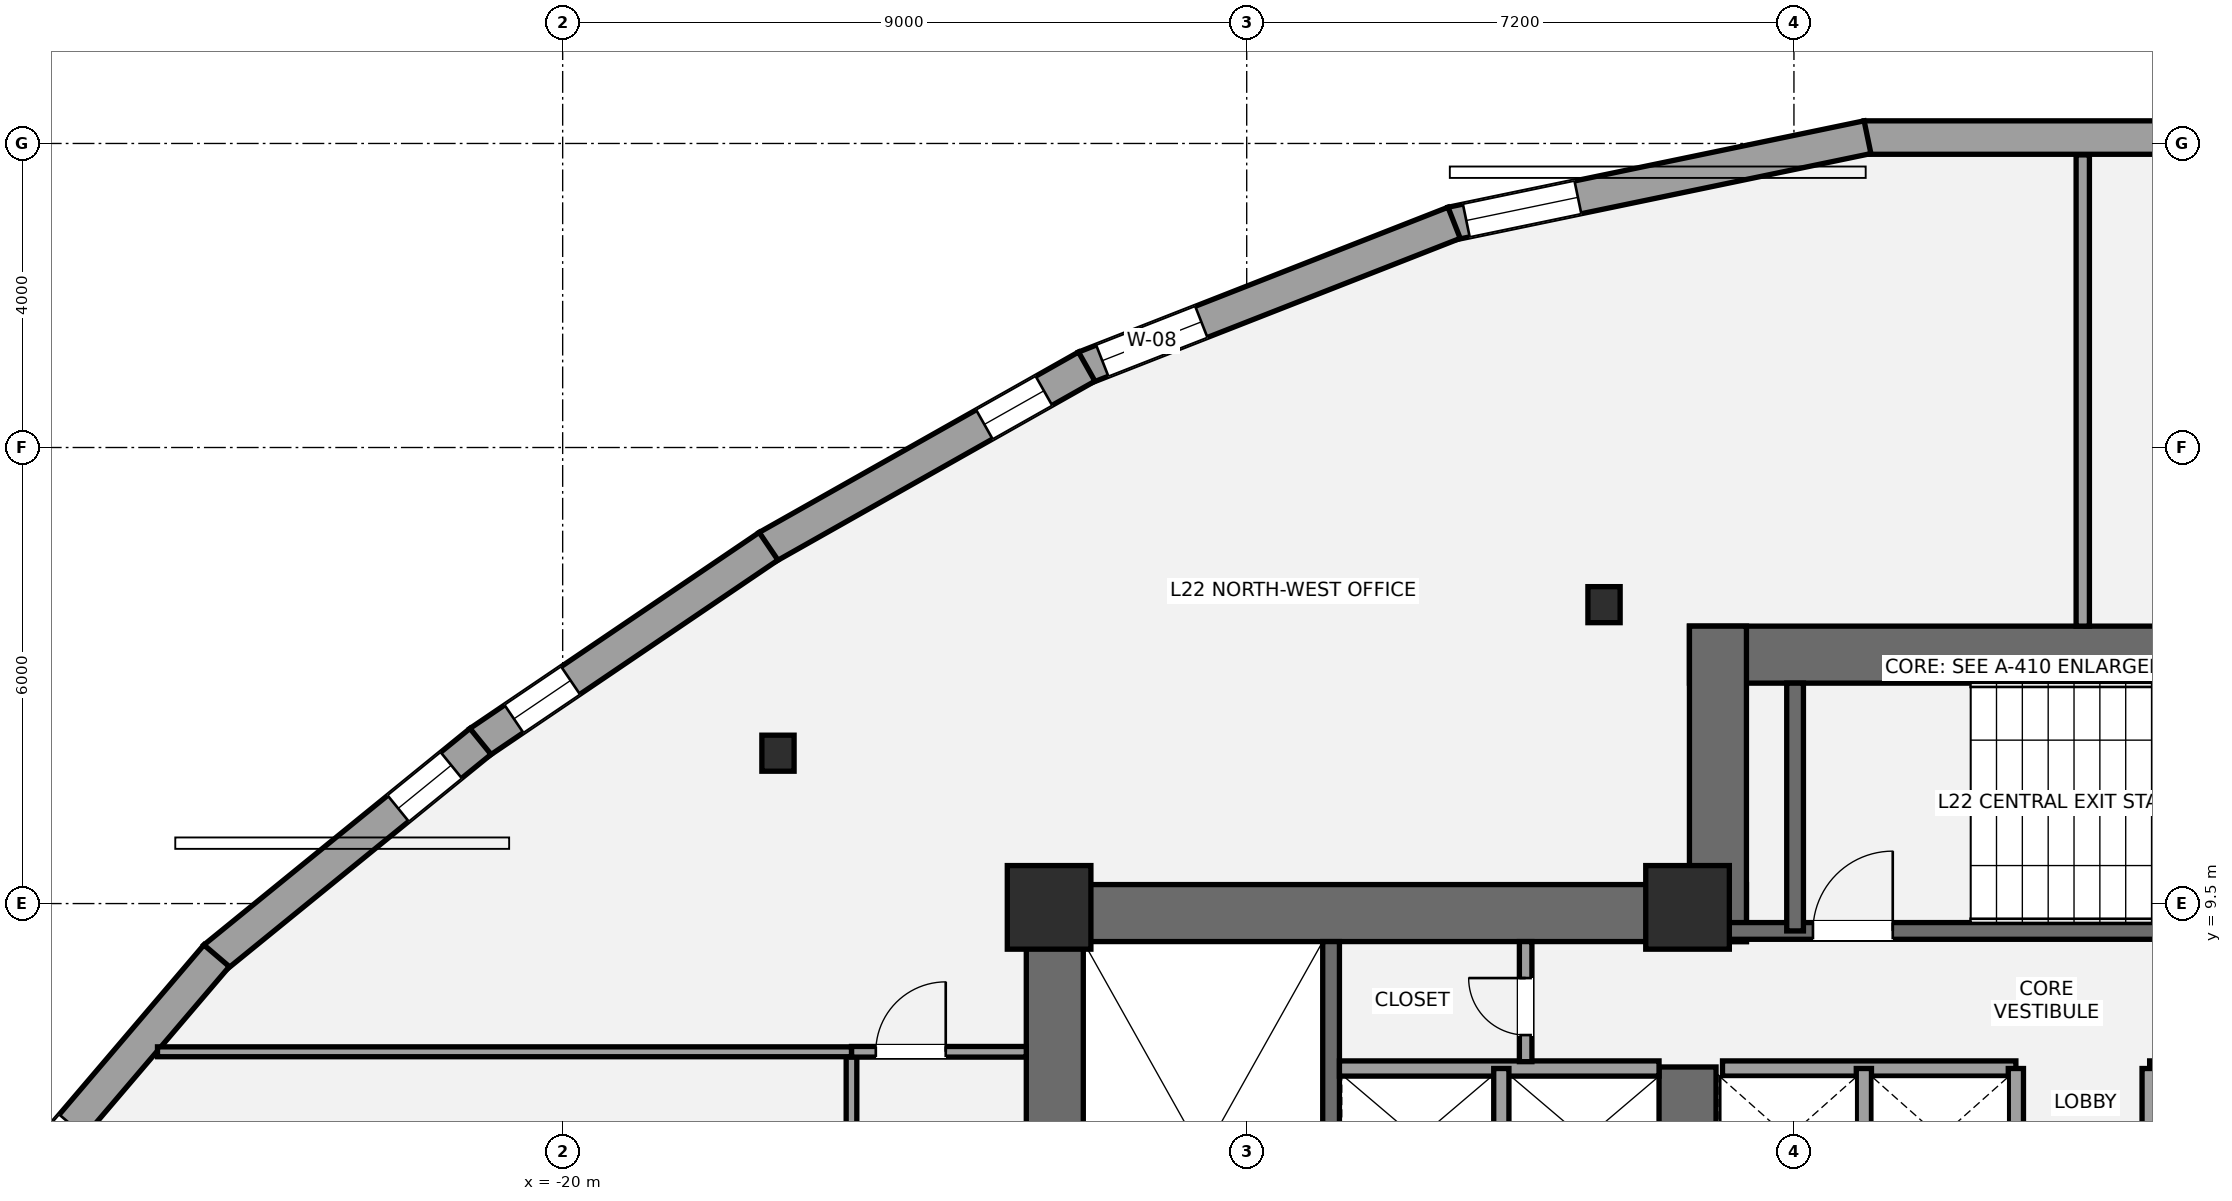
"""IFC4 building model, lengths in metres.
Left out: names, types, materials, properties, quantities, classifications, styles, units other than length and angle.
Written with IfcOpenShell. Run it as: python <this file> out.ifc"""

import sys

from ifc_helpers import new_model, si_unit, direction, frame, frame_2d, origin, origin_2d, place, context, subcontext, project, spatial, rectangle, i_section, extrude, element, fill, save


model = new_model("IFC4")
c1 = context("Model", 3, precision=1e-05, world=origin(), true_north=direction((0.0, 1.0)))
c2 = subcontext(c1, "Body", "Model", "MODEL_VIEW")
j1 = project(units=[si_unit("LENGTHUNIT", "METRE"), si_unit("PLANEANGLEUNIT", "RADIAN")], contexts=[c1])
p1 = place(None, origin())
s1 = spatial("IfcSite", under=j1, at=p1, CompositionType="ELEMENT")
p2 = place(p1, origin())
s2 = spatial("IfcBuilding", under=s1, at=p2, CompositionType="ELEMENT")
p3 = place(p2, frame((0.0, 0.0, 86.1)))
s3 = spatial("IfcBuildingStorey", under=s2, at=p3, CompositionType="ELEMENT", Elevation=86.1)
p4 = place(p3, frame((-13.525, 1.1, 0.0), z_axis=(0.0, 0.0, 1.0), x_axis=(0.0, 1.0, 0.0)))
e1 = element("IfcWall", 1, at=p4, inside=s3, PredefinedType="SHEAR", context=c2, shape_type="SweptSolid", body=[
    extrude(rectangle(XDim=8.65, YDim=0.75, at=frame_2d((4.325, 0.0))), origin(), (0.0, 0.0, 1.0), 3.5),
])
p5 = place(p3, frame((-13.9, 9.375, 0.0), z_axis=(0.0, 0.0, 1.0), x_axis=(1.0, 0.0, 0.0)))
e2 = element("IfcWall", 2, at=p5, inside=s3, PredefinedType="SHEAR", context=c2, shape_type="SweptSolid", body=[
    extrude(rectangle(XDim=9.475, YDim=0.75, at=frame_2d((4.737, 0.0))), origin(), (0.0, 0.0, 1.0), 3.5),
])
p6 = place(p3, frame((-5.2, 5.35, 0.0), z_axis=(0.0, 0.0, 1.0), x_axis=(0.0, 1.0, 0.0)))
e3 = element("IfcWall", 3, at=p6, inside=s3, PredefinedType="SHEAR", context=c2, shape_type="SweptSolid", body=[
    extrude(rectangle(XDim=2.0, YDim=0.75, at=frame_2d((1.0, 0.0))), origin(), (0.0, 0.0, 1.0), 3.5),
])
p7 = place(p3, frame((-9.89, 1.85, 0.0), z_axis=(0.0, 0.0, 1.0), x_axis=(0.0, 1.0, 0.0)))
e4 = element("IfcWall", 4, at=p7, inside=s3, PredefinedType="SHEAR", context=c2, shape_type="SweptSolid", body=[
    extrude(rectangle(XDim=7.15, YDim=0.22, at=frame_2d((3.575, 0.0))), origin(), (0.0, 0.0, 1.0), 3.5),
])
p8 = place(p3, frame((-5.175, 12.775, 0.0), z_axis=(0.0, 0.0, 1.0), x_axis=(1.0, 0.0, 0.0)))
e5 = element("IfcWall", 5, at=p8, inside=s3, PredefinedType="SHEAR", context=c2, shape_type="SweptSolid", body=[
    extrude(rectangle(XDim=10.35, YDim=0.75, at=frame_2d((5.175, 0.0))), origin(), (0.0, 0.0, 1.0), 3.5),
])
p9 = place(p3, frame((-4.8, 9.0, 0.0), z_axis=(0.0, 0.0, 1.0), x_axis=(0.0, 1.0, 0.0)))
e6 = element("IfcWall", 6, at=p9, inside=s3, PredefinedType="SHEAR", context=c2, shape_type="SweptSolid", body=[
    extrude(rectangle(XDim=4.15, YDim=0.75, at=frame_2d((2.075, 0.0))), origin(), (0.0, 0.0, 1.0), 3.5),
])
p10 = place(p3, frame((-4.7, 9.14, 0.0), z_axis=(0.0, 0.0, 1.0), x_axis=(1.0, 0.0, 0.0)))
e7 = element("IfcWall", 7, at=p10, inside=s3, PredefinedType="SHEAR", context=c2, shape_type="SweptSolid", body=[
    extrude(rectangle(XDim=9.3, YDim=0.22, at=frame_2d((4.65, 0.0))), origin(), (0.0, 0.0, 1.0), 3.5),
])
p11 = place(p10, frame((1.15, 0.0, 0.0)))
e8 = element("IfcOpeningElement", 8, at=p11, cuts=e7, PredefinedType="OPENING", context=c2, shape_type="SweptSolid", body=[
    extrude(rectangle(XDim=1.05, YDim=2.15, at=frame_2d((0.525, 1.075))), frame((0.0, 0.12, 0.0), z_axis=(0.0, -1.0, 0.0), x_axis=(1.0, 0.0, 0.0)), (0.0, 0.0, 1.0), 0.24),
])
p12 = place(p3, frame((-3.785, 9.14, 0.0), z_axis=(0.0, 0.0, 1.0), x_axis=(0.0, 1.0, 0.0)))
e9 = element("IfcWall", 9, at=p12, inside=s3, PredefinedType="SHEAR", context=c2, shape_type="SweptSolid", body=[
    extrude(rectangle(XDim=3.26, YDim=0.22, at=frame_2d((1.63, 0.0))), origin(), (0.0, 0.0, 1.0), 3.5),
])
for number, where, z_axis, x_axis in (
    (10, (-13.6, 9.45, 0.0), (0.0, 0.0, 1.0), (1.0, 0.0, 0.0)),
    (11, (-5.2, 9.45, 0.0), (0.0, 0.0, 1.0), (1.0, 0.0, 0.0)),
):
    element("IfcColumn", number, at=place(p3, frame(where, z_axis=z_axis, x_axis=x_axis)), inside=s3, PredefinedType="COLUMN", context=c2, shape_type="SweptSolid", body=[
        extrude(rectangle(XDim=1.1, YDim=1.1, at=origin_2d()), origin(), (0.0, 0.0, 1.0), 3.5),
    ])
for number, where, z_axis, x_axis in (
    (12, (-6.299, 13.433, 0.0), (0.0, 0.0, 1.0), (1.0, 0.0, 0.0)),
    (13, (-17.167, 11.478, 0.0), (0.0, 0.0, 1.0), (1.0, 0.0, 0.0)),
):
    element("IfcColumn", number, at=place(p3, frame(where, z_axis=z_axis, x_axis=x_axis)), inside=s3, PredefinedType="COLUMN", context=c2, shape_type="SweptSolid", body=[
        extrude(i_section(OverallWidth=0.424, OverallDepth=0.474, WebThickness=0.048, FlangeThickness=0.077, at=origin_2d()), origin(), (0.0, 0.0, 1.0), 3.5),
    ])
p13 = place(p3, frame((-2.877, 19.578, 0.0), z_axis=(0.0, 0.0, 1.0), x_axis=(1.0, 0.0, 0.0)))
e14 = element("IfcWall", 14, at=p13, inside=s3, PredefinedType="STANDARD", context=c2, shape_type="SweptSolid", body=[
    extrude(rectangle(XDim=5.753, YDim=0.44, at=frame_2d((2.877, 0.0))), origin(), (0.0, 0.0, 1.0), 2.528),
])
p14 = place(p13, frame((4.004, 0.0, 0.65)))
e15 = element("IfcOpeningElement", 15, at=p14, cuts=e14, PredefinedType="OPENING", context=c2, shape_type="SweptSolid", body=[
    extrude(rectangle(XDim=1.5, YDim=1.7, at=frame_2d((0.75, 0.85))), frame((0.0, 0.23, 0.0), z_axis=(0.0, -1.0, 0.0), x_axis=(1.0, 0.0, 0.0)), (0.0, 0.0, 1.0), 0.46),
])
p15 = place(p3, frame((-8.307, 18.446, 0.0), z_axis=(0.0, 0.0, 1.0), x_axis=(0.979118590293, 0.20328990664, 0.0)))
e16 = element("IfcWall", 16, at=p15, inside=s3, PredefinedType="STANDARD", context=c2, shape_type="SweptSolid", body=[
    extrude(rectangle(XDim=5.592, YDim=0.44, at=frame_2d((2.796, 0.0))), origin(), (0.0, 0.0, 1.0), 2.528),
])
p16 = place(p15, frame((0.2, 0.0, 0.65)))
e17 = element("IfcOpeningElement", 17, at=p16, cuts=e16, PredefinedType="OPENING", context=c2, shape_type="SweptSolid", body=[
    extrude(rectangle(XDim=1.5, YDim=1.7, at=frame_2d((0.75, 0.85))), frame((0.0, 0.23, 0.0), z_axis=(0.0, -1.0, 0.0), x_axis=(1.0, 0.0, 0.0)), (0.0, 0.0, 1.0), 0.46),
])
p17 = place(p3, frame((-13.133, 16.551, 0.0), z_axis=(0.0, 0.0, 1.0), x_axis=(0.931059171354, 0.364868222017, 0.0)))
e18 = element("IfcWall", 18, at=p17, inside=s3, PredefinedType="STANDARD", context=c2, shape_type="SweptSolid", body=[
    extrude(rectangle(XDim=5.222, YDim=0.44, at=frame_2d((2.611, 0.0))), origin(), (0.0, 0.0, 1.0), 2.528),
])
p18 = place(p17, frame((0.25, 0.0, 0.58)))
e19 = element("IfcOpeningElement", 19, at=p18, cuts=e18, PredefinedType="OPENING", context=c2, shape_type="SweptSolid", body=[
    extrude(rectangle(XDim=1.4, YDim=1.55, at=frame_2d((0.7, 0.775))), frame((0.0, 0.23, 0.0), z_axis=(0.0, -1.0, 0.0), x_axis=(1.0, 0.0, 0.0)), (0.0, 0.0, 1.0), 0.46),
])
p19 = place(p3, frame((-17.306, 14.191, 0.0), z_axis=(0.0, 0.0, 1.0), x_axis=(0.870732411856, 0.491757121903, 0.0)))
e20 = element("IfcWall", 20, at=p19, inside=s3, PredefinedType="STANDARD", context=c2, shape_type="SweptSolid", body=[
    extrude(rectangle(XDim=4.825, YDim=0.44, at=frame_2d((2.413, 0.0))), origin(), (0.0, 0.0, 1.0), 2.528),
])
p20 = place(p19, frame((3.278, 0.0, 0.58)))
e21 = element("IfcOpeningElement", 21, at=p20, cuts=e20, PredefinedType="OPENING", context=c2, shape_type="SweptSolid", body=[
    extrude(rectangle(XDim=0.9, YDim=1.35, at=frame_2d((0.45, 0.675))), frame((0.0, 0.23, 0.0), z_axis=(0.0, -1.0, 0.0), x_axis=(1.0, 0.0, 0.0)), (0.0, 0.0, 1.0), 0.46),
])
p21 = place(p3, frame((-21.096, 11.622, 0.0), z_axis=(0.0, 0.0, 1.0), x_axis=(0.827777061901, 0.561057159112, 0.0)))
e22 = element("IfcWall", 22, at=p21, inside=s3, PredefinedType="STANDARD", context=c2, shape_type="SweptSolid", body=[
    extrude(rectangle(XDim=4.597, YDim=0.44, at=frame_2d((2.298, 0.0))), origin(), (0.0, 0.0, 1.0), 2.528),
])
p22 = place(p21, frame((0.55, 0.0, 0.58)))
e23 = element("IfcOpeningElement", 23, at=p22, cuts=e22, PredefinedType="OPENING", context=c2, shape_type="SweptSolid", body=[
    extrude(rectangle(XDim=0.9, YDim=1.35, at=frame_2d((0.45, 0.675))), frame((0.0, 0.23, 0.0), z_axis=(0.0, -1.0, 0.0), x_axis=(1.0, 0.0, 0.0)), (0.0, 0.0, 1.0), 0.46),
])
p23 = place(p3, frame((-24.582, 8.785, 0.0), z_axis=(0.0, 0.0, 1.0), x_axis=(0.775728286929, 0.631067052585, 0.0)))
e24 = element("IfcWall", 24, at=p23, inside=s3, PredefinedType="STANDARD", context=c2, shape_type="SweptSolid", body=[
    extrude(rectangle(XDim=4.513, YDim=0.44, at=frame_2d((2.256, 0.0))), origin(), (0.0, 0.0, 1.0), 2.528),
])
p24 = place(p23, frame((3.116, 0.0, 0.58)))
e25 = element("IfcOpeningElement", 25, at=p24, cuts=e24, PredefinedType="OPENING", context=c2, shape_type="SweptSolid", body=[
    extrude(rectangle(XDim=0.9, YDim=1.35, at=frame_2d((0.45, 0.675))), frame((0.0, 0.23, 0.0), z_axis=(0.0, -1.0, 0.0), x_axis=(1.0, 0.0, 0.0)), (0.0, 0.0, 1.0), 0.46),
])
p25 = place(p3, frame((-27.364, 5.518, 0.0), z_axis=(0.0, 0.0, 1.0), x_axis=(0.648913975558, 0.760861782669, 0.0)))
e26 = element("IfcWall", 26, at=p25, inside=s3, PredefinedType="STANDARD", context=c2, shape_type="SweptSolid", body=[
    extrude(rectangle(XDim=4.331, YDim=0.44, at=frame_2d((2.166, 0.0))), origin(), (0.0, 0.0, 1.0), 2.528),
])
p26 = place(p25, frame((0.498, 0.0, 0.58)))
e27 = element("IfcOpeningElement", 27, at=p26, cuts=e26, PredefinedType="OPENING", context=c2, shape_type="SweptSolid", body=[
    extrude(rectangle(XDim=0.9, YDim=1.35, at=frame_2d((0.45, 0.675))), frame((0.0, 0.23, 0.0), z_axis=(0.0, -1.0, 0.0), x_axis=(1.0, 0.0, 0.0)), (0.0, 0.0, 1.0), 0.46),
])
p27 = place(p3, frame((-9.78, 7.33, 0.0), z_axis=(0.0, 0.0, 1.0), x_axis=(1.0, 0.0, 0.0)))
e28 = element("IfcWall", 28, at=p27, inside=s3, PredefinedType="SOLIDWALL", context=c2, shape_type="SweptSolid", body=[
    extrude(rectangle(XDim=4.205, YDim=0.2, at=frame_2d((2.103, 0.0))), origin(), (0.0, 0.0, 1.0), 3.31),
])
p28 = place(p3, frame((-7.65, 5.47, 0.0), z_axis=(0.0, 0.0, 1.0), x_axis=(0.0, 1.0, 0.0)))
e29 = element("IfcWall", 29, at=p28, inside=s3, PredefinedType="SOLIDWALL", context=c2, shape_type="SweptSolid", body=[
    extrude(rectangle(XDim=1.86, YDim=0.2, at=frame_2d((0.93, 0.0))), origin(), (0.0, 0.0, 1.0), 3.31),
])
for number, where, z_axis, x_axis in (
    (30, (-4.74, 7.33, 0.0), (0.0, 0.0, 1.0), (1.0, 0.0, 0.0)),
    (31, (0.88, 7.33, 0.0), (0.0, 0.0, 1.0), (1.0, 0.0, 0.0)),
):
    element("IfcWall", number, at=place(p3, frame(where, z_axis=z_axis, x_axis=x_axis)), inside=s3, PredefinedType="SOLIDWALL", context=c2, shape_type="SweptSolid", body=[
        extrude(rectangle(XDim=3.86, YDim=0.2, at=frame_2d((1.93, 0.0))), origin(), (0.0, 0.0, 1.0), 3.31),
    ])
for number, where, z_axis, x_axis in (
    (32, (-2.88, 5.52, 0.0), (0.0, 0.0, 1.0), (0.0, 1.0, 0.0)),
    (33, (-0.88, 5.52, 0.0), (0.0, 0.0, 1.0), (0.0, 1.0, 0.0)),
    (34, (0.88, 5.52, 0.0), (0.0, 0.0, 1.0), (0.0, 1.0, 0.0)),
):
    element("IfcWall", number, at=place(p3, frame(where, z_axis=z_axis, x_axis=x_axis)), inside=s3, PredefinedType="SOLIDWALL", context=c2, shape_type="SweptSolid", body=[
        extrude(rectangle(XDim=1.81, YDim=0.2, at=frame_2d((0.905, 0.0))), origin(), (0.0, 0.0, 1.0), 3.31),
    ])
p29 = place(p3, frame((-7.33, 7.42, 0.0), z_axis=(0.0, 0.0, 1.0), x_axis=(0.0, 1.0, 0.0)))
e35 = element("IfcWall", 35, at=p29, inside=s3, PredefinedType="PARTITIONING", context=c2, shape_type="SweptSolid", body=[
    extrude(rectangle(XDim=1.58, YDim=0.165, at=frame_2d((0.79, 0.0))), origin(), (0.0, 0.0, 1.0), 3.31),
])
p30 = place(p29, frame((0.35, 0.0, 0.0)))
e36 = element("IfcOpeningElement", 36, at=p30, cuts=e35, PredefinedType="OPENING", context=c2, shape_type="SweptSolid", body=[
    extrude(rectangle(XDim=0.75, YDim=2.1, at=frame_2d((0.375, 1.05))), frame((0.0, 0.093, 0.0), z_axis=(0.0, -1.0, 0.0), x_axis=(1.0, 0.0, 0.0)), (0.0, 0.0, 1.0), 0.185),
])
p31 = place(p3, frame((-16.2, -14.554, 0.0), z_axis=(0.0, 0.0, 1.0), x_axis=(0.0, 1.0, 0.0)))
e37 = element("IfcWall", 37, at=p31, inside=s3, PredefinedType="PARTITIONING", context=c2, shape_type="SweptSolid", body=[
    extrude(rectangle(XDim=22.104, YDim=0.14, at=frame_2d((11.052, 0.0))), origin(), (0.0, 0.0, 1.0), 2.751),
])
p32 = place(p31, frame((12.204, 0.0, 0.0)))
e38 = element("IfcOpeningElement", 38, at=p32, cuts=e37, PredefinedType="OPENING", context=c2, shape_type="SweptSolid", body=[
    extrude(rectangle(XDim=0.9, YDim=2.1, at=frame_2d((0.45, 1.05))), frame((0.0, 0.08, 0.0), z_axis=(0.0, -1.0, 0.0), x_axis=(1.0, 0.0, 0.0)), (0.0, 0.0, 1.0), 0.16),
])
p33 = place(p31, frame((18.879, 0.0, 0.0)))
e39 = element("IfcOpeningElement", 39, at=p33, cuts=e37, PredefinedType="OPENING", context=c2, shape_type="SweptSolid", body=[
    extrude(rectangle(XDim=0.9, YDim=2.1, at=frame_2d((0.45, 1.05))), frame((0.0, 0.08, 0.0), z_axis=(0.0, -1.0, 0.0), x_axis=(1.0, 0.0, 0.0)), (0.0, 0.0, 1.0), 0.16),
])
p34 = place(p3, frame((-16.2, 7.55, 0.0), z_axis=(0.0, 0.0, 1.0), x_axis=(1.0, 0.0, 0.0)))
e40 = element("IfcWall", 40, at=p34, inside=s3, PredefinedType="PARTITIONING", context=c2, shape_type="SweptSolid", body=[
    extrude(rectangle(XDim=2.3, YDim=0.14, at=frame_2d((1.15, 0.0))), origin(), (0.0, 0.0, 1.0), 2.763),
])
p35 = place(p34, frame((0.32, 0.0, 0.0)))
e41 = element("IfcOpeningElement", 41, at=p35, cuts=e40, PredefinedType="OPENING", context=c2, shape_type="SweptSolid", body=[
    extrude(rectangle(XDim=0.92, YDim=2.15, at=frame_2d((0.46, 1.075))), frame((0.0, 0.08, 0.0), z_axis=(0.0, -1.0, 0.0), x_axis=(1.0, 0.0, 0.0)), (0.0, 0.0, 1.0), 0.16),
])
p36 = place(p3, frame((0.0, 13.15, 0.0), z_axis=(0.0, 0.0, 1.0), x_axis=(0.0, 1.0, 0.0)))
e42 = element("IfcWall", 42, at=p36, inside=s3, PredefinedType="PARTITIONING", context=c2, shape_type="SweptSolid", body=[
    extrude(rectangle(XDim=6.2, YDim=0.175, at=frame_2d((3.1, 0.0))), origin(), (0.0, 0.0, 1.0), 2.763),
])
p37 = place(p3, frame((-25.331, 7.55, 0.0), z_axis=(0.0, 0.0, 1.0), x_axis=(1.0, 0.0, 0.0)))
e43 = element("IfcWall", 43, at=p37, inside=s3, PredefinedType="PARTITIONING", context=c2, shape_type="SweptSolid", body=[
    extrude(rectangle(XDim=9.131, YDim=0.13, at=frame_2d((4.565, 0.0))), origin(), (0.0, 0.0, 1.0), 2.763),
])
p38 = place(p16, origin())
e44 = element("IfcWindow", 44, at=p38, inside=s3, PartitioningType="SINGLE_PANEL", PredefinedType="WINDOW", context=c2, shape_type="SweptSolid", body=[
    extrude(rectangle(XDim=1.5, YDim=1.7, at=frame_2d((0.75, 0.85))), frame((0.0, -0.01, 0.0), z_axis=(0.0, -1.0, 0.0), x_axis=(1.0, 0.0, 0.0)), (0.0, 0.0, 1.0), 0.06),
])
fill(e17, e44)
p39 = place(p18, origin())
e45 = element("IfcWindow", 45, at=p39, inside=s3, PartitioningType="SINGLE_PANEL", PredefinedType="WINDOW", context=c2, shape_type="SweptSolid", body=[
    extrude(rectangle(XDim=1.4, YDim=1.55, at=frame_2d((0.7, 0.775))), frame((0.0, -0.01, 0.0), z_axis=(0.0, -1.0, 0.0), x_axis=(1.0, 0.0, 0.0)), (0.0, 0.0, 1.0), 0.06),
])
fill(e19, e45)
p40 = place(p20, origin())
e46 = element("IfcWindow", 46, at=p40, inside=s3, PartitioningType="SINGLE_PANEL", PredefinedType="WINDOW", context=c2, shape_type="SweptSolid", body=[
    extrude(rectangle(XDim=0.9, YDim=1.35, at=frame_2d((0.45, 0.675))), frame((0.0, -0.01, 0.0), z_axis=(0.0, -1.0, 0.0), x_axis=(1.0, 0.0, 0.0)), (0.0, 0.0, 1.0), 0.06),
])
fill(e21, e46)
p41 = place(p22, origin())
e47 = element("IfcWindow", 47, at=p41, inside=s3, PartitioningType="SINGLE_PANEL", PredefinedType="WINDOW", context=c2, shape_type="SweptSolid", body=[
    extrude(rectangle(XDim=0.9, YDim=1.35, at=frame_2d((0.45, 0.675))), frame((0.0, -0.01, 0.0), z_axis=(0.0, -1.0, 0.0), x_axis=(1.0, 0.0, 0.0)), (0.0, 0.0, 1.0), 0.06),
])
fill(e23, e47)
p42 = place(p24, origin())
e48 = element("IfcWindow", 48, at=p42, inside=s3, PartitioningType="SINGLE_PANEL", PredefinedType="WINDOW", context=c2, shape_type="SweptSolid", body=[
    extrude(rectangle(XDim=0.9, YDim=1.35, at=frame_2d((0.45, 0.675))), frame((0.0, -0.01, 0.0), z_axis=(0.0, -1.0, 0.0), x_axis=(1.0, 0.0, 0.0)), (0.0, 0.0, 1.0), 0.06),
])
fill(e25, e48)
p43 = place(p11, origin())
e49 = element("IfcDoor", 49, at=p43, inside=s3, OperationType="SINGLE_SWING_RIGHT", PredefinedType="DOOR", context=c2, shape_type="SweptSolid", body=[
    extrude(rectangle(XDim=1.05, YDim=2.15, at=frame_2d((0.525, 1.075))), frame((0.0, 0.025, 0.0), z_axis=(0.0, -1.0, 0.0), x_axis=(1.0, 0.0, 0.0)), (0.0, 0.0, 1.0), 0.05),
])
fill(e8, e49)
p44 = place(p30, origin())
e50 = element("IfcDoor", 50, at=p44, inside=s3, OperationType="SINGLE_SWING_RIGHT", PredefinedType="DOOR", context=c2, shape_type="SweptSolid", body=[
    extrude(rectangle(XDim=0.75, YDim=2.1, at=frame_2d((0.375, 1.05))), frame((0.0, 0.025, 0.0), z_axis=(0.0, -1.0, 0.0), x_axis=(1.0, 0.0, 0.0)), (0.0, 0.0, 1.0), 0.05),
])
fill(e36, e50)
p45 = place(p35, origin())
e51 = element("IfcDoor", 51, at=p45, inside=s3, OperationType="SINGLE_SWING_RIGHT", PredefinedType="DOOR", context=c2, shape_type="SweptSolid", body=[
    extrude(rectangle(XDim=0.92, YDim=2.15, at=frame_2d((0.46, 1.075))), frame((0.0, 0.025, 0.0), z_axis=(0.0, -1.0, 0.0), x_axis=(1.0, 0.0, 0.0)), (0.0, 0.0, 1.0), 0.05),
])
fill(e41, e51)
save(model, sys.argv[1])
